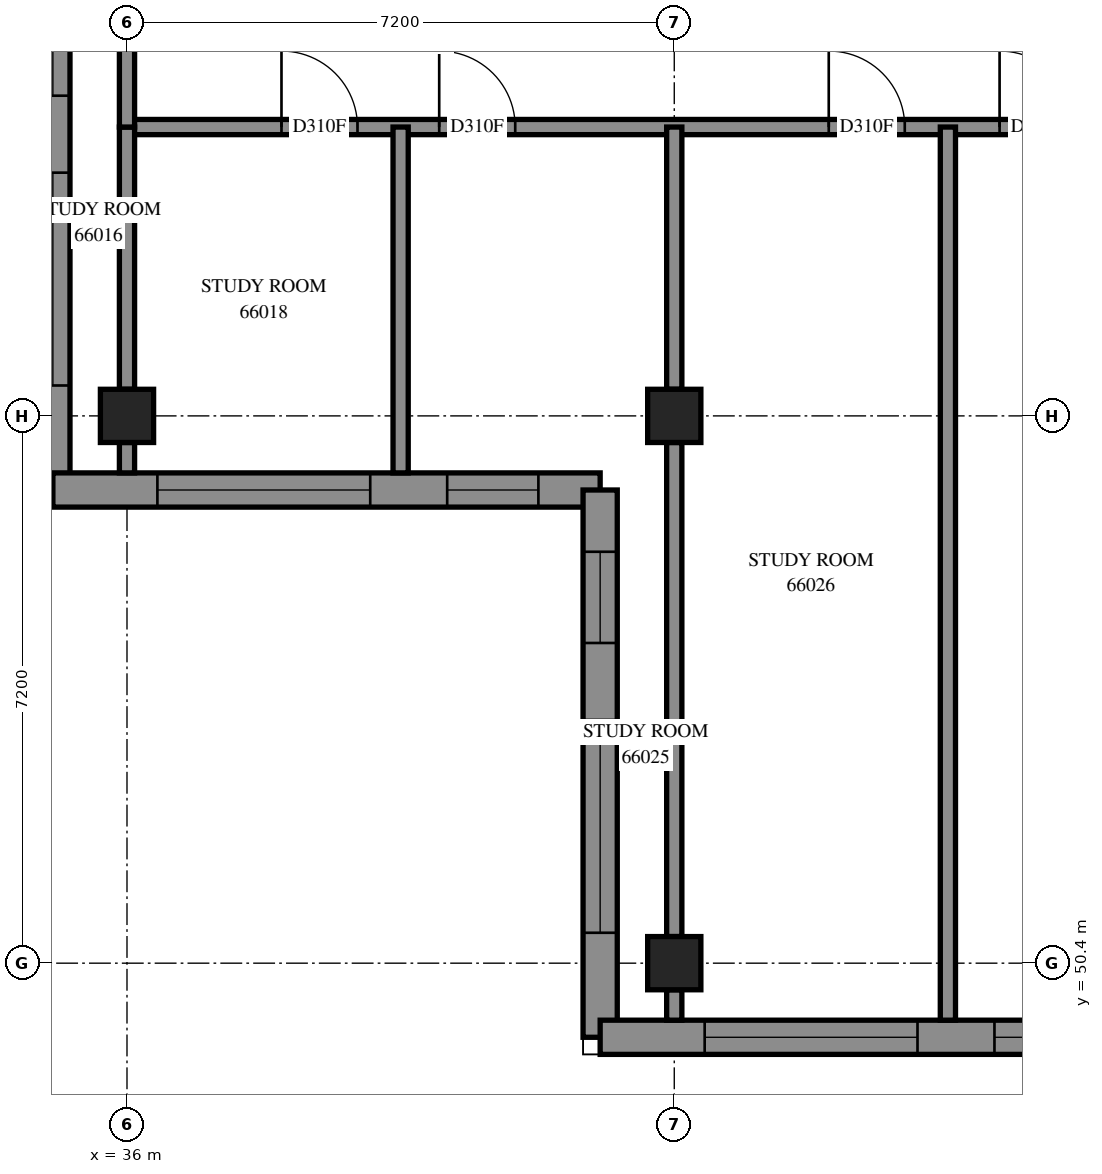
"""IFC4 building model, lengths in metres.
Left out: names, types, materials, properties, quantities, classifications, styles, units other than length and angle.
Written with IfcOpenShell. Run it as: python <this file> out.ifc"""

import sys

from ifc_helpers import new_model, si_unit, direction, frame, frame_2d, origin, origin_2d, place, context, subcontext, project, spatial, polyline, rectangle, outline, extrude, element, fill, save


model = new_model("IFC4")
c1 = context("Model", 3, precision=1e-05, world=origin(), true_north=direction((0.0, 1.0)))
c2 = subcontext(c1, "Body", "Model", "MODEL_VIEW")
j1 = project(units=[si_unit("LENGTHUNIT", "METRE"), si_unit("PLANEANGLEUNIT", "RADIAN")], contexts=[c1])
p1 = place(None, origin())
s1 = spatial("IfcSite", under=j1, at=p1, CompositionType="ELEMENT")
p2 = place(p1, origin())
s2 = spatial("IfcBuilding", under=s1, at=p2, CompositionType="ELEMENT")
p3 = place(p2, frame((0.0, 0.0, 243.8)))
s3 = spatial("IfcBuildingStorey", under=s2, at=p3, CompositionType="ELEMENT", Elevation=243.8)
for number, where, z_axis, x_axis in (
    (1, (36.0, 57.6, 0.0), (0.0, 0.0, 1.0), (1.0, 0.0, 0.0)),
    (2, (43.2, 50.4, 0.0), (0.0, 0.0, 1.0), (1.0, 0.0, 0.0)),
    (3, (43.2, 57.6, 0.0), (0.0, 0.0, 1.0), (1.0, 0.0, 0.0)),
):
    element("IfcColumn", number, at=place(p3, frame(where, z_axis=z_axis, x_axis=x_axis)), inside=s3, PredefinedType="COLUMN", context=c2, shape_type="SweptSolid", body=[
        extrude(rectangle(XDim=0.7, YDim=0.7, at=origin_2d()), origin(), (0.0, 0.0, 1.0), 3.1),
    ])
p4 = place(p3, frame((35.025, 63.825, 0.0), z_axis=(0.0, 0.0, 1.0), x_axis=(0.0, -1.0, 0.0)))
e4 = element("IfcWall", 4, at=p4, inside=s3, PredefinedType="SOLIDWALL", context=c2, shape_type="SweptSolid", body=[
    extrude(outline(polyline([(0.225, -0.225), (7.425, -0.225), (6.975, 0.225), (-0.225, 0.225), (0.225, -0.225)])), origin(), (0.0, 0.0, 1.0), 3.1),
])
p5 = place(p4, frame((3.025, 0.0, 0.45)))
e5 = element("IfcOpeningElement", 5, at=p5, cuts=e4, PredefinedType="OPENING", context=c2, shape_type="SweptSolid", body=[
    extrude(rectangle(XDim=2.8, YDim=2.55, at=frame_2d((1.4, 1.275))), frame((0.0, 0.235, 0.0), z_axis=(0.0, -1.0, 0.0), x_axis=(1.0, 0.0, 0.0)), (0.0, 0.0, 1.0), 0.47),
])
p6 = place(p4, frame((0.812, 0.0, 0.45)))
e6 = element("IfcOpeningElement", 6, at=p6, cuts=e4, PredefinedType="OPENING", context=c2, shape_type="SweptSolid", body=[
    extrude(rectangle(XDim=1.2, YDim=2.55, at=frame_2d((0.6, 1.275))), frame((0.0, 0.235, 0.0), z_axis=(0.0, -1.0, 0.0), x_axis=(1.0, 0.0, 0.0)), (0.0, 0.0, 1.0), 0.47),
])
p7 = place(p3, frame((35.025, 56.625, 0.0), z_axis=(0.0, 0.0, 1.0), x_axis=(1.0, 0.0, 0.0)))
e7 = element("IfcWall", 7, at=p7, inside=s3, PredefinedType="SOLIDWALL", context=c2, shape_type="SweptSolid", body=[
    extrude(outline(polyline([(-0.225, -0.225), (6.975, -0.225), (7.425, 0.225), (0.225, 0.225), (-0.225, -0.225)])), origin(), (0.0, 0.0, 1.0), 3.1),
])
p8 = place(p7, frame((1.375, 0.0, 0.45)))
e8 = element("IfcOpeningElement", 8, at=p8, cuts=e7, PredefinedType="OPENING", context=c2, shape_type="SweptSolid", body=[
    extrude(rectangle(XDim=2.8, YDim=2.55, at=frame_2d((1.4, 1.275))), frame((0.0, 0.235, 0.0), z_axis=(0.0, -1.0, 0.0), x_axis=(1.0, 0.0, 0.0)), (0.0, 0.0, 1.0), 0.47),
])
p9 = place(p7, frame((5.188, 0.0, 0.45)))
e9 = element("IfcOpeningElement", 9, at=p9, cuts=e7, PredefinedType="OPENING", context=c2, shape_type="SweptSolid", body=[
    extrude(rectangle(XDim=1.2, YDim=2.55, at=frame_2d((0.6, 1.275))), frame((0.0, 0.235, 0.0), z_axis=(0.0, -1.0, 0.0), x_axis=(1.0, 0.0, 0.0)), (0.0, 0.0, 1.0), 0.47),
])
p10 = place(p3, frame((42.225, 56.625, 0.0), z_axis=(0.0, 0.0, 1.0), x_axis=(0.0, -1.0, 0.0)))
e10 = element("IfcWall", 10, at=p10, inside=s3, PredefinedType="SOLIDWALL", context=c2, shape_type="SweptSolid", body=[
    extrude(outline(polyline([(0.225, -0.225), (7.425, -0.225), (6.975, 0.225), (-0.225, 0.225), (0.225, -0.225)])), origin(), (0.0, 0.0, 1.0), 3.1),
])
p11 = place(p10, frame((3.025, 0.0, 0.45)))
e11 = element("IfcOpeningElement", 11, at=p11, cuts=e10, PredefinedType="OPENING", context=c2, shape_type="SweptSolid", body=[
    extrude(rectangle(XDim=2.8, YDim=2.55, at=frame_2d((1.4, 1.275))), frame((0.0, 0.235, 0.0), z_axis=(0.0, -1.0, 0.0), x_axis=(1.0, 0.0, 0.0)), (0.0, 0.0, 1.0), 0.47),
])
p12 = place(p10, frame((0.812, 0.0, 0.45)))
e12 = element("IfcOpeningElement", 12, at=p12, cuts=e10, PredefinedType="OPENING", context=c2, shape_type="SweptSolid", body=[
    extrude(rectangle(XDim=1.2, YDim=2.55, at=frame_2d((0.6, 1.275))), frame((0.0, 0.235, 0.0), z_axis=(0.0, -1.0, 0.0), x_axis=(1.0, 0.0, 0.0)), (0.0, 0.0, 1.0), 0.47),
])
p13 = place(p3, frame((42.225, 49.425, 0.0), z_axis=(0.0, 0.0, 1.0), x_axis=(1.0, 0.0, 0.0)))
e13 = element("IfcWall", 13, at=p13, inside=s3, PredefinedType="SOLIDWALL", context=c2, shape_type="SweptSolid", body=[
    extrude(outline(polyline([(-0.225, -0.225), (6.975, -0.225), (7.425, 0.225), (0.225, 0.225), (-0.225, -0.225)])), origin(), (0.0, 0.0, 1.0), 3.1),
])
p14 = place(p13, frame((1.375, 0.0, 0.45)))
e14 = element("IfcOpeningElement", 14, at=p14, cuts=e13, PredefinedType="OPENING", context=c2, shape_type="SweptSolid", body=[
    extrude(rectangle(XDim=2.8, YDim=2.55, at=frame_2d((1.4, 1.275))), frame((0.0, 0.235, 0.0), z_axis=(0.0, -1.0, 0.0), x_axis=(1.0, 0.0, 0.0)), (0.0, 0.0, 1.0), 0.47),
])
p15 = place(p13, frame((5.188, 0.0, 0.45)))
e15 = element("IfcOpeningElement", 15, at=p15, cuts=e13, PredefinedType="OPENING", context=c2, shape_type="SweptSolid", body=[
    extrude(rectangle(XDim=1.2, YDim=2.55, at=frame_2d((0.6, 1.275))), frame((0.0, 0.235, 0.0), z_axis=(0.0, -1.0, 0.0), x_axis=(1.0, 0.0, 0.0)), (0.0, 0.0, 1.0), 0.47),
])
p16 = place(p3, frame((36.0, 61.4, 0.0), z_axis=(0.0, 0.0, 1.0), x_axis=(1.0, 0.0, 0.0)))
e16 = element("IfcWall", 16, at=p16, inside=s3, PredefinedType="PARTITIONING", context=c2, shape_type="SweptSolid", body=[
    extrude(rectangle(XDim=17.0, YDim=0.2, at=frame_2d((8.5, 0.0))), origin(), (0.0, 0.0, 1.0), 3.1),
])
p17 = place(p16, frame((2.033, 0.0, 0.0)))
e17 = element("IfcOpeningElement", 17, at=p17, cuts=e16, PredefinedType="OPENING", context=c2, shape_type="SweptSolid", body=[
    extrude(rectangle(XDim=1.0, YDim=2.1, at=frame_2d((0.5, 1.05))), frame((0.0, 0.11, 0.0), z_axis=(0.0, -1.0, 0.0), x_axis=(1.0, 0.0, 0.0)), (0.0, 0.0, 1.0), 0.22),
])
p18 = place(p16, frame((4.107, 0.0, 0.0)))
e18 = element("IfcOpeningElement", 18, at=p18, cuts=e16, PredefinedType="OPENING", context=c2, shape_type="SweptSolid", body=[
    extrude(rectangle(XDim=1.0, YDim=2.1, at=frame_2d((0.5, 1.05))), frame((0.0, 0.11, 0.0), z_axis=(0.0, -1.0, 0.0), x_axis=(1.0, 0.0, 0.0)), (0.0, 0.0, 1.0), 0.22),
])
p19 = place(p16, frame((9.232, 0.0, 0.0)))
e19 = element("IfcOpeningElement", 19, at=p19, cuts=e16, PredefinedType="OPENING", context=c2, shape_type="SweptSolid", body=[
    extrude(rectangle(XDim=1.0, YDim=2.1, at=frame_2d((0.5, 1.05))), frame((0.0, 0.11, 0.0), z_axis=(0.0, -1.0, 0.0), x_axis=(1.0, 0.0, 0.0)), (0.0, 0.0, 1.0), 0.22),
])
p20 = place(p16, frame((11.48, 0.0, 0.0)))
e20 = element("IfcOpeningElement", 20, at=p20, cuts=e16, PredefinedType="OPENING", context=c2, shape_type="SweptSolid", body=[
    extrude(rectangle(XDim=1.0, YDim=2.1, at=frame_2d((0.5, 1.05))), frame((0.0, 0.11, 0.0), z_axis=(0.0, -1.0, 0.0), x_axis=(1.0, 0.0, 0.0)), (0.0, 0.0, 1.0), 0.22),
])
p21 = place(p16, frame((15.805, 0.0, 0.0)))
e21 = element("IfcOpeningElement", 21, at=p21, cuts=e16, PredefinedType="OPENING", context=c2, shape_type="SweptSolid", body=[
    extrude(rectangle(XDim=1.0, YDim=2.1, at=frame_2d((0.5, 1.05))), frame((0.0, 0.11, 0.0), z_axis=(0.0, -1.0, 0.0), x_axis=(1.0, 0.0, 0.0)), (0.0, 0.0, 1.0), 0.22),
])
p22 = place(p3, frame((46.8, 49.65, 0.0), z_axis=(0.0, 0.0, 1.0), x_axis=(0.0, 1.0, 0.0)))
e22 = element("IfcWall", 22, at=p22, inside=s3, PredefinedType="PARTITIONING", context=c2, shape_type="SweptSolid", body=[
    extrude(rectangle(XDim=11.75, YDim=0.2, at=frame_2d((5.875, 0.0))), origin(), (0.0, 0.0, 1.0), 3.1),
])
p23 = place(p3, frame((43.2, 50.75, 0.0), z_axis=(0.0, 0.0, 1.0), x_axis=(0.0, 1.0, 0.0)))
e23 = element("IfcWall", 23, at=p23, inside=s3, PredefinedType="PARTITIONING", context=c2, shape_type="SweptSolid", body=[
    extrude(rectangle(XDim=6.5, YDim=0.2, at=frame_2d((3.25, 0.0))), origin(), (0.0, 0.0, 1.0), 3.1),
])
p24 = place(p3, frame((39.6, 56.85, 0.0), z_axis=(0.0, 0.0, 1.0), x_axis=(0.0, 1.0, 0.0)))
e24 = element("IfcWall", 24, at=p24, inside=s3, PredefinedType="PARTITIONING", context=c2, shape_type="SweptSolid", body=[
    extrude(rectangle(XDim=4.55, YDim=0.2, at=frame_2d((2.275, 0.0))), origin(), (0.0, 0.0, 1.0), 3.1),
])
p25 = place(p3, frame((36.0, 57.95, 0.0), z_axis=(0.0, 0.0, 1.0), x_axis=(0.0, 1.0, 0.0)))
e25 = element("IfcWall", 25, at=p25, inside=s3, PredefinedType="PARTITIONING", context=c2, shape_type="SweptSolid", body=[
    extrude(rectangle(XDim=3.45, YDim=0.2, at=frame_2d((1.725, 0.0))), origin(), (0.0, 0.0, 1.0), 2.6),
])
p26 = place(p3, frame((43.2, 57.95, 0.0), z_axis=(0.0, 0.0, 1.0), x_axis=(0.0, 1.0, 0.0)))
e26 = element("IfcWall", 26, at=p26, inside=s3, PredefinedType="PARTITIONING", context=c2, shape_type="SweptSolid", body=[
    extrude(rectangle(XDim=3.45, YDim=0.2, at=frame_2d((1.725, 0.0))), origin(), (0.0, 0.0, 1.0), 3.1),
])
p27 = place(p3, frame((36.0, 61.4, 0.0), z_axis=(0.0, 0.0, 1.0), x_axis=(0.0, 1.0, 0.0)))
e27 = element("IfcWall", 27, at=p27, inside=s3, PredefinedType="PARTITIONING", context=c2, shape_type="SweptSolid", body=[
    extrude(rectangle(XDim=2.0, YDim=0.2, at=frame_2d((1.0, 0.0))), origin(), (0.0, 0.0, 1.0), 2.6),
])
for number, where, z_axis, x_axis in (
    (28, (36.0, 56.85, 0.0), (0.0, 0.0, 1.0), (0.0, 1.0, 0.0)),
    (29, (43.2, 49.65, 0.0), (0.0, 0.0, 1.0), (0.0, 1.0, 0.0)),
):
    element("IfcWall", number, at=place(p3, frame(where, z_axis=z_axis, x_axis=x_axis)), inside=s3, PredefinedType="PARTITIONING", context=c2, shape_type="SweptSolid", body=[
        extrude(rectangle(XDim=0.4, YDim=0.2, at=frame_2d((0.2, 0.0))), origin(), (0.0, 0.0, 1.0), 3.1),
    ])
p28 = place(p5, origin())
e30 = element("IfcWindow", 30, at=p28, inside=s3, PartitioningType="SINGLE_PANEL", PredefinedType="WINDOW", context=c2, shape_type="SweptSolid", body=[
    extrude(rectangle(XDim=2.8, YDim=2.55, at=frame_2d((1.4, 1.275))), frame((0.0, 0.205, 0.0), z_axis=(0.0, -1.0, 0.0), x_axis=(1.0, 0.0, 0.0)), (0.0, 0.0, 1.0), 0.06),
])
fill(e5, e30)
p29 = place(p6, origin())
e31 = element("IfcWindow", 31, at=p29, inside=s3, PartitioningType="SINGLE_PANEL", PredefinedType="WINDOW", context=c2, shape_type="SweptSolid", body=[
    extrude(rectangle(XDim=1.2, YDim=2.55, at=frame_2d((0.6, 1.275))), frame((0.0, 0.205, 0.0), z_axis=(0.0, -1.0, 0.0), x_axis=(1.0, 0.0, 0.0)), (0.0, 0.0, 1.0), 0.06),
])
fill(e6, e31)
p30 = place(p8, origin())
e32 = element("IfcWindow", 32, at=p30, inside=s3, PartitioningType="SINGLE_PANEL", PredefinedType="WINDOW", context=c2, shape_type="SweptSolid", body=[
    extrude(rectangle(XDim=2.8, YDim=2.55, at=frame_2d((1.4, 1.275))), frame((0.0, 0.205, 0.0), z_axis=(0.0, -1.0, 0.0), x_axis=(1.0, 0.0, 0.0)), (0.0, 0.0, 1.0), 0.06),
])
fill(e8, e32)
p31 = place(p9, origin())
e33 = element("IfcWindow", 33, at=p31, inside=s3, PartitioningType="SINGLE_PANEL", PredefinedType="WINDOW", context=c2, shape_type="SweptSolid", body=[
    extrude(rectangle(XDim=1.2, YDim=2.55, at=frame_2d((0.6, 1.275))), frame((0.0, 0.205, 0.0), z_axis=(0.0, -1.0, 0.0), x_axis=(1.0, 0.0, 0.0)), (0.0, 0.0, 1.0), 0.06),
])
fill(e9, e33)
p32 = place(p11, origin())
e34 = element("IfcWindow", 34, at=p32, inside=s3, PartitioningType="SINGLE_PANEL", PredefinedType="WINDOW", context=c2, shape_type="SweptSolid", body=[
    extrude(rectangle(XDim=2.8, YDim=2.55, at=frame_2d((1.4, 1.275))), frame((0.0, 0.205, 0.0), z_axis=(0.0, -1.0, 0.0), x_axis=(1.0, 0.0, 0.0)), (0.0, 0.0, 1.0), 0.06),
])
fill(e11, e34)
p33 = place(p12, origin())
e35 = element("IfcWindow", 35, at=p33, inside=s3, PartitioningType="SINGLE_PANEL", PredefinedType="WINDOW", context=c2, shape_type="SweptSolid", body=[
    extrude(rectangle(XDim=1.2, YDim=2.55, at=frame_2d((0.6, 1.275))), frame((0.0, 0.205, 0.0), z_axis=(0.0, -1.0, 0.0), x_axis=(1.0, 0.0, 0.0)), (0.0, 0.0, 1.0), 0.06),
])
fill(e12, e35)
p34 = place(p14, origin())
e36 = element("IfcWindow", 36, at=p34, inside=s3, PartitioningType="SINGLE_PANEL", PredefinedType="WINDOW", context=c2, shape_type="SweptSolid", body=[
    extrude(rectangle(XDim=2.8, YDim=2.55, at=frame_2d((1.4, 1.275))), frame((0.0, 0.205, 0.0), z_axis=(0.0, -1.0, 0.0), x_axis=(1.0, 0.0, 0.0)), (0.0, 0.0, 1.0), 0.06),
])
fill(e14, e36)
p35 = place(p15, origin())
e37 = element("IfcWindow", 37, at=p35, inside=s3, PartitioningType="SINGLE_PANEL", PredefinedType="WINDOW", context=c2, shape_type="SweptSolid", body=[
    extrude(rectangle(XDim=1.2, YDim=2.55, at=frame_2d((0.6, 1.275))), frame((0.0, 0.205, 0.0), z_axis=(0.0, -1.0, 0.0), x_axis=(1.0, 0.0, 0.0)), (0.0, 0.0, 1.0), 0.06),
])
fill(e15, e37)
p36 = place(p17, origin())
e38 = element("IfcDoor", 38, at=p36, inside=s3, OperationType="SINGLE_SWING_LEFT", PredefinedType="DOOR", context=c2, shape_type="SweptSolid", body=[
    extrude(rectangle(XDim=1.0, YDim=2.1, at=frame_2d((0.5, 1.05))), frame((0.0, 0.025, 0.0), z_axis=(0.0, -1.0, 0.0), x_axis=(1.0, 0.0, 0.0)), (0.0, 0.0, 1.0), 0.05),
])
fill(e17, e38)
p37 = place(p18, origin())
e39 = element("IfcDoor", 39, at=p37, inside=s3, OperationType="SINGLE_SWING_RIGHT", PredefinedType="DOOR", context=c2, shape_type="SweptSolid", body=[
    extrude(rectangle(XDim=1.0, YDim=2.1, at=frame_2d((0.5, 1.05))), frame((0.0, 0.025, 0.0), z_axis=(0.0, -1.0, 0.0), x_axis=(1.0, 0.0, 0.0)), (0.0, 0.0, 1.0), 0.05),
])
fill(e18, e39)
p38 = place(p19, origin())
e40 = element("IfcDoor", 40, at=p38, inside=s3, OperationType="SINGLE_SWING_LEFT", PredefinedType="DOOR", context=c2, shape_type="SweptSolid", body=[
    extrude(rectangle(XDim=1.0, YDim=2.1, at=frame_2d((0.5, 1.05))), frame((0.0, 0.025, 0.0), z_axis=(0.0, -1.0, 0.0), x_axis=(1.0, 0.0, 0.0)), (0.0, 0.0, 1.0), 0.05),
])
fill(e19, e40)
p39 = place(p20, origin())
e41 = element("IfcDoor", 41, at=p39, inside=s3, OperationType="SINGLE_SWING_RIGHT", PredefinedType="DOOR", context=c2, shape_type="SweptSolid", body=[
    extrude(rectangle(XDim=1.0, YDim=2.1, at=frame_2d((0.5, 1.05))), frame((0.0, 0.025, 0.0), z_axis=(0.0, -1.0, 0.0), x_axis=(1.0, 0.0, 0.0)), (0.0, 0.0, 1.0), 0.05),
])
fill(e20, e41)
save(model, sys.argv[1])
